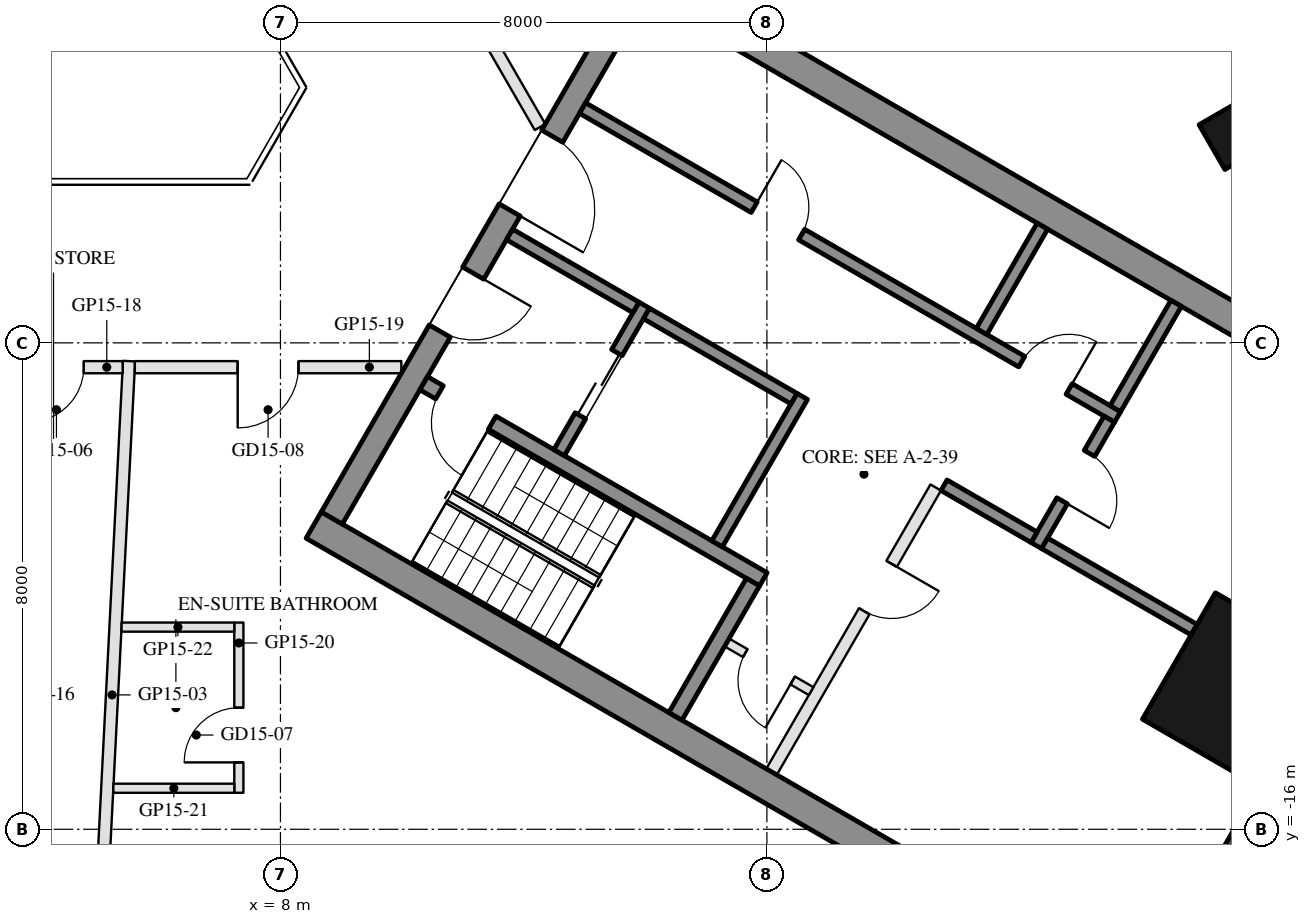
"""IFC4 building model, lengths in metres.
Left out: names, types, materials, properties, quantities, classifications, styles, units other than length and angle.
Written with IfcOpenShell. Run it as: python <this file> out.ifc"""

import sys

from ifc_helpers import new_model, si_unit, direction, frame, frame_2d, origin, origin_2d, place, context, subcontext, project, spatial, rectangle, hollow_rectangle, extrude, element, fill, save


model = new_model("IFC4")
c1 = context("Model", 3, precision=1e-05, world=origin(), true_north=direction((0.0, 1.0)))
c2 = subcontext(c1, "Body", "Model", "MODEL_VIEW")
j1 = project(units=[si_unit("LENGTHUNIT", "METRE"), si_unit("PLANEANGLEUNIT", "RADIAN")], contexts=[c1])
p1 = place(None, origin())
s1 = spatial("IfcSite", under=j1, at=p1, CompositionType="ELEMENT")
p2 = place(p1, origin())
s2 = spatial("IfcBuilding", under=s1, at=p2, CompositionType="ELEMENT")
p3 = place(p2, frame((0.0, 0.0, 168.8)))
s3 = spatial("IfcBuildingStorey", under=s2, at=p3, CompositionType="ELEMENT", Elevation=168.8)
p4 = place(p3, frame((23.688, -4.568, 0.0), z_axis=(0.0, 0.0, 1.0), x_axis=(-0.5, 0.866025403784, 0.0)))
e1 = element("IfcColumn", 1, at=p4, inside=s3, PredefinedType="COLUMN", context=c2, shape_type="SweptSolid", body=[
    extrude(hollow_rectangle(XDim=0.85, YDim=0.85, WallThickness=0.04, at=origin_2d()), origin(), (0.0, 0.0, 1.0), 3.7),
])
p5 = place(p3, frame((23.729, -13.7, 0.0), z_axis=(0.0, 0.0, 1.0), x_axis=(0.5, 0.866025403784, 0.0)))
e2 = element("IfcColumn", 2, at=p5, inside=s3, PredefinedType="COLUMN", context=c2, shape_type="SweptSolid", body=[
    extrude(hollow_rectangle(XDim=2.4, YDim=2.2, WallThickness=0.06, at=origin_2d()), origin(), (0.0, 0.0, 1.0), 3.7),
])
p6 = place(p3, frame((23.427, -16.792, 0.0), z_axis=(0.0, 0.0, 1.0), x_axis=(0.500018773155, 0.866014564827, 0.0)))
e3 = element("IfcWall", 3, at=p6, inside=s3, PredefinedType="SOLIDWALL", context=c2, shape_type="SweptSolid", body=[
    extrude(rectangle(XDim=5.658, YDim=0.35, at=frame_2d((2.829, 0.0))), origin(), (0.0, 0.0, 1.0), 3.55),
])
p7 = place(p3, frame((26.257, -6.567, 0.0), z_axis=(0.0, 0.0, 1.0), x_axis=(-0.500023526245, 0.866011820475, 0.0)))
e4 = element("IfcWall", 4, at=p7, inside=s3, PredefinedType="SOLIDWALL", context=c2, shape_type="SweptSolid", body=[
    extrude(rectangle(XDim=11.816, YDim=0.35, at=frame_2d((5.908, 0.0))), origin(), (0.0, 0.0, 1.0), 3.55),
])
p8 = place(p7, frame((0.38, 0.0, 0.3)))
e5 = element("IfcOpeningElement", 5, at=p8, cuts=e4, PredefinedType="OPENING", context=c2, shape_type="SweptSolid", body=[
    extrude(rectangle(XDim=1.8, YDim=2.65, at=frame_2d((0.9, 1.325))), frame((0.0, 0.185, 0.0), z_axis=(0.0, -1.0, 0.0), x_axis=(1.0, 0.0, 0.0)), (0.0, 0.0, 1.0), 0.37),
])
p9 = place(p7, frame((7.741, 0.0, 0.0)))
e6 = element("IfcOpeningElement", 6, at=p9, cuts=e4, PredefinedType="OPENING", context=c2, shape_type="SweptSolid", body=[
    extrude(rectangle(XDim=2.4, YDim=2.4, at=frame_2d((1.2, 1.2))), frame((0.0, 0.185, 0.0), z_axis=(0.0, -1.0, 0.0), x_axis=(1.0, 0.0, 0.0)), (0.0, 0.0, 1.0), 0.37),
])
p10 = place(p7, frame((3.791, 0.0, 0.3)))
e7 = element("IfcOpeningElement", 7, at=p10, cuts=e4, PredefinedType="OPENING", context=c2, shape_type="SweptSolid", body=[
    extrude(rectangle(XDim=1.6, YDim=2.65, at=frame_2d((0.8, 1.325))), frame((0.0, 0.185, 0.0), z_axis=(0.0, -1.0, 0.0), x_axis=(1.0, 0.0, 0.0)), (0.0, 0.0, 1.0), 0.37),
])
p11 = place(p7, frame((5.691, 0.0, 0.3)))
e8 = element("IfcOpeningElement", 8, at=p11, cuts=e4, PredefinedType="OPENING", context=c2, shape_type="SweptSolid", body=[
    extrude(rectangle(XDim=1.6, YDim=2.65, at=frame_2d((0.8, 1.325))), frame((0.0, 0.185, 0.0), z_axis=(0.0, -1.0, 0.0), x_axis=(1.0, 0.0, 0.0)), (0.0, 0.0, 1.0), 0.37),
])
for number, where, z_axis, x_axis in (
    (9, (8.547, -10.997, 0.0), (0.0, 0.0, 1.0), (0.866, -0.5, 0.0)),
    (10, (13.797, -1.903, 0.0), (0.0, 0.0, 1.0), (0.866, -0.5, 0.0)),
):
    element("IfcWall", number, at=place(p3, frame(where, z_axis=z_axis, x_axis=x_axis)), inside=s3, PredefinedType="SHEAR", context=c2, shape_type="SweptSolid", body=[
        extrude(rectangle(XDim=14.837, YDim=0.5, at=frame_2d((7.418, 0.0))), origin(), (0.0, 0.0, 1.0), 3.5),
    ])
p12 = place(p3, frame((8.845, -10.88, 0.0), z_axis=(0.0, 0.0, 1.0), x_axis=(0.500004234368, 0.866022959057, 0.0)))
e11 = element("IfcWall", 11, at=p12, inside=s3, PredefinedType="SHEAR", context=c2, shape_type="SweptSolid", body=[
    extrude(rectangle(XDim=10.0, YDim=0.4, at=frame_2d((5.0, 0.0))), origin(), (0.0, 0.0, 1.0), 3.5),
])
p13 = place(p12, frame((3.55, 0.0, 0.0)))
e12 = element("IfcOpeningElement", 12, at=p13, cuts=e11, PredefinedType="OPENING", context=c2, shape_type="SweptSolid", body=[
    extrude(rectangle(XDim=1.1, YDim=2.1, at=frame_2d((0.55, 1.05))), frame((0.0, 0.21, 0.0), z_axis=(0.0, -1.0, 0.0), x_axis=(1.0, 0.0, 0.0)), (0.0, 0.0, 1.0), 0.42),
])
p14 = place(p12, frame((5.85, 0.0, 0.0)))
e13 = element("IfcOpeningElement", 13, at=p14, cuts=e11, PredefinedType="OPENING", context=c2, shape_type="SweptSolid", body=[
    extrude(rectangle(XDim=1.4, YDim=2.1, at=frame_2d((0.7, 1.05))), frame((0.0, 0.21, 0.0), z_axis=(0.0, -1.0, 0.0), x_axis=(1.0, 0.0, 0.0)), (0.0, 0.0, 1.0), 0.42),
])
p15 = place(p3, frame((10.356, -8.664, 0.0), z_axis=(0.0, 0.0, 1.0), x_axis=(0.866028629588, -0.499994412703, 0.0)))
e14 = element("IfcWall", 14, at=p15, inside=s3, PredefinedType="SHEAR", context=c2, shape_type="SweptSolid", body=[
    extrude(rectangle(XDim=6.45, YDim=0.25, at=frame_2d((3.225, 0.0))), origin(), (0.0, 0.0, 1.0), 3.5),
])
p16 = place(p15, frame((0.3, 0.0, 0.0)))
e15 = element("IfcOpeningElement", 15, at=p16, cuts=e14, PredefinedType="OPENING", context=c2, shape_type="SweptSolid", body=[
    extrude(rectangle(XDim=1.0, YDim=2.1, at=frame_2d((0.5, 1.05))), frame((0.0, 0.135, 0.0), z_axis=(0.0, -1.0, 0.0), x_axis=(1.0, 0.0, 0.0)), (0.0, 0.0, 1.0), 0.27),
])
p17 = place(p3, frame((14.496, -14.143, 0.0), z_axis=(0.0, 0.0, 1.0), x_axis=(0.500062241894, 0.865989465428, 0.0)))
e16 = element("IfcWall", 16, at=p17, inside=s3, PredefinedType="SHEAR", context=c2, shape_type="SweptSolid", body=[
    extrude(rectangle(XDim=2.55, YDim=0.25, at=frame_2d((1.275, 0.0))), origin(), (0.0, 0.0, 1.0), 3.5),
])
p18 = place(p3, frame((15.181, -11.305, 0.0), z_axis=(0.0, 0.0, 1.0), x_axis=(0.49994636267, 0.866056369097, 0.0)))
e17 = element("IfcWall", 17, at=p18, inside=s3, PredefinedType="SHEAR", context=c2, shape_type="SweptSolid", body=[
    extrude(rectangle(XDim=2.8, YDim=0.2, at=frame_2d((1.4, 0.0))), origin(), (0.0, 0.0, 1.0), 3.5),
])
p19 = place(p3, frame((12.583, -9.805, 0.0), z_axis=(0.0, 0.0, 1.0), x_axis=(0.49994636267, 0.866056369097, 0.0)))
e18 = element("IfcWall", 18, at=p19, inside=s3, PredefinedType="SHEAR", context=c2, shape_type="SweptSolid", body=[
    extrude(rectangle(XDim=2.8, YDim=0.2, at=frame_2d((1.4, 0.0))), origin(), (0.0, 0.0, 1.0), 3.5),
])
p20 = place(p19, frame((0.7, 0.0, 0.0)))
e19 = element("IfcOpeningElement", 19, at=p20, cuts=e18, PredefinedType="OPENING", context=c2, shape_type="SweptSolid", body=[
    extrude(rectangle(XDim=1.2, YDim=2.1, at=frame_2d((0.6, 1.05))), frame((0.0, 0.11, 0.0), z_axis=(0.0, -1.0, 0.0), x_axis=(1.0, 0.0, 0.0)), (0.0, 0.0, 1.0), 0.22),
])
p21 = place(p3, frame((11.768, -6.217, 0.0), z_axis=(0.0, 0.0, 1.0), x_axis=(0.866050077142, -0.499957262057, 0.0)))
e20 = element("IfcWall", 20, at=p21, inside=s3, PredefinedType="SHEAR", context=c2, shape_type="SweptSolid", body=[
    extrude(rectangle(XDim=2.4, YDim=0.2, at=frame_2d((1.2, 0.0))), origin(), (0.0, 0.0, 1.0), 3.5),
])
p22 = place(p3, frame((14.02, -7.517, 0.0), z_axis=(0.0, 0.0, 1.0), x_axis=(0.866034573852, -0.49998411664, 0.0)))
e21 = element("IfcWall", 21, at=p22, inside=s3, PredefinedType="SHEAR", context=c2, shape_type="SweptSolid", body=[
    extrude(rectangle(XDim=2.8, YDim=0.2, at=frame_2d((1.4, 0.0))), origin(), (0.0, 0.0, 1.0), 3.5),
])
p23 = place(p3, frame((12.968, -4.138, 0.0), z_axis=(0.0, 0.0, 1.0), x_axis=(0.866028328073, -0.49999493495, 0.0)))
e22 = element("IfcWall", 22, at=p23, inside=s3, PredefinedType="SHEAR", context=c2, shape_type="SweptSolid", body=[
    extrude(rectangle(XDim=10.16, YDim=0.2, at=frame_2d((5.08, 0.0))), origin(), (0.0, 0.0, 1.0), 3.5),
])
p24 = place(p23, frame((3.26, 0.0, 0.0)))
e23 = element("IfcOpeningElement", 23, at=p24, cuts=e22, PredefinedType="OPENING", context=c2, shape_type="SweptSolid", body=[
    extrude(rectangle(XDim=0.9, YDim=2.1, at=frame_2d((0.45, 1.05))), frame((0.0, 0.11, 0.0), z_axis=(0.0, -1.0, 0.0), x_axis=(1.0, 0.0, 0.0)), (0.0, 0.0, 1.0), 0.22),
])
p25 = place(p23, frame((8.34, 0.0, 0.0)))
e24 = element("IfcOpeningElement", 24, at=p25, cuts=e22, PredefinedType="OPENING", context=c2, shape_type="SweptSolid", body=[
    extrude(rectangle(XDim=0.9, YDim=2.1, at=frame_2d((0.45, 1.05))), frame((0.0, 0.11, 0.0), z_axis=(0.0, -1.0, 0.0), x_axis=(1.0, 0.0, 0.0)), (0.0, 0.0, 1.0), 0.22),
])
p26 = place(p3, frame((20.43, -11.333, 0.0), z_axis=(0.0, 0.0, 1.0), x_axis=(0.500001309137, 0.866024647952, 0.0)))
e25 = element("IfcWall", 25, at=p26, inside=s3, PredefinedType="SHEAR", context=c2, shape_type="SweptSolid", body=[
    extrude(rectangle(XDim=2.4, YDim=0.2, at=frame_2d((1.2, 0.0))), origin(), (0.0, 0.0, 1.0), 3.5),
])
p27 = place(p26, frame((0.85, 0.0, 0.0)))
e26 = element("IfcOpeningElement", 26, at=p27, cuts=e25, PredefinedType="OPENING", context=c2, shape_type="SweptSolid", body=[
    extrude(rectangle(XDim=0.9, YDim=2.1, at=frame_2d((0.45, 1.05))), frame((0.0, 0.11, 0.0), z_axis=(0.0, -1.0, 0.0), x_axis=(1.0, 0.0, 0.0)), (0.0, 0.0, 1.0), 0.22),
])
p28 = place(p3, frame((18.913, -10.342, 0.0), z_axis=(0.0, 0.0, 1.0), x_axis=(0.866038183914, -0.499977863513, 0.0)))
e27 = element("IfcWall", 27, at=p28, inside=s3, PredefinedType="SHEAR", context=c2, shape_type="SweptSolid", body=[
    extrude(rectangle(XDim=1.71, YDim=0.2, at=frame_2d((0.855, 0.0))), origin(), (0.0, 0.0, 1.0), 3.5),
])
for number, where, z_axis, x_axis in (
    (28, (19.531, -7.812, 0.0), (0.0, 0.0, 1.0), (0.5, 0.866, 0.0)),
    (29, (21.73, -9.082, 0.0), (0.0, 0.0, 1.0), (0.5, 0.866, 0.0)),
):
    element("IfcWall", number, at=place(p3, frame(where, z_axis=z_axis, x_axis=x_axis)), inside=s3, PredefinedType="SHEAR", context=c2, shape_type="SweptSolid", body=[
        extrude(rectangle(XDim=2.0, YDim=0.2, at=frame_2d((1.0, 0.0))), origin(), (0.0, 0.0, 1.0), 3.5),
    ])
p29 = place(p3, frame((20.567, -11.297, 0.0), z_axis=(0.0, 0.0, 1.0), x_axis=(0.866055327414, -0.49994816717, 0.0)))
e30 = element("IfcWall", 30, at=p29, inside=s3, PredefinedType="SHEAR", context=c2, shape_type="SweptSolid", body=[
    extrude(rectangle(XDim=2.84, YDim=0.2, at=frame_2d((1.42, 0.0))), origin(), (0.0, 0.0, 1.0), 3.5),
])
p30 = place(p3, frame((16.076, -15.055, 0.0), z_axis=(0.0, 0.0, 1.0), x_axis=(0.499995103361, 0.866028230842, 0.0)))
e31 = element("IfcWall", 31, at=p30, inside=s3, PredefinedType="PARTITIONING", context=c2, shape_type="SweptSolid", body=[
    extrude(rectangle(XDim=5.4, YDim=0.2, at=frame_2d((2.7, 0.0))), origin(), (0.0, 0.0, 1.0), 3.5),
])
p31 = place(p30, frame((3.05, 0.0, 0.0)))
e32 = element("IfcOpeningElement", 32, at=p31, cuts=e31, PredefinedType="OPENING", context=c2, shape_type="SweptSolid", body=[
    extrude(rectangle(XDim=0.9, YDim=2.1, at=frame_2d((0.45, 1.05))), frame((0.0, 0.11, 0.0), z_axis=(0.0, -1.0, 0.0), x_axis=(1.0, 0.0, 0.0)), (0.0, 0.0, 1.0), 0.22),
])
p32 = place(p3, frame((15.342, -12.928, 0.0), z_axis=(0.0, 0.0, 1.0), x_axis=(0.865989903783, -0.500061482766, 0.0)))
e33 = element("IfcWall", 33, at=p32, inside=s3, PredefinedType="PARTITIONING", context=c2, shape_type="SweptSolid", body=[
    extrude(rectangle(XDim=1.6, YDim=0.15, at=frame_2d((0.8, 0.0))), origin(), (0.0, 0.0, 1.0), 3.5),
])
p33 = place(p32, frame((0.35, 0.0, 0.0)))
e34 = element("IfcOpeningElement", 34, at=p33, cuts=e33, PredefinedType="OPENING", context=c2, shape_type="SweptSolid", body=[
    extrude(rectangle(XDim=0.9, YDim=2.1, at=frame_2d((0.45, 1.05))), frame((0.0, 0.085, 0.0), z_axis=(0.0, -1.0, 0.0), x_axis=(1.0, 0.0, 0.0)), (0.0, 0.0, 1.0), 0.17),
])
p34 = place(p3, frame((4.95, -19.28, 0.0), z_axis=(0.0, 0.0, 1.0), x_axis=(0.050963172582, 0.998700533213, 0.0)))
e35 = element("IfcWall", 35, at=p34, inside=s3, PredefinedType="PARTITIONING", context=c2, shape_type="SweptSolid", body=[
    extrude(rectangle(XDim=10.994, YDim=0.2, at=frame_2d((5.497, 0.0))), origin(), (0.0, 0.0, 1.0), 3.06),
])
p35 = place(p3, frame((5.405, -8.4, 0.0), z_axis=(0.0, 0.0, 1.0), x_axis=(-1.0, 0.0, 0.0)))
e36 = element("IfcWall", 36, at=p35, inside=s3, PredefinedType="PARTITIONING", context=c2, shape_type="SweptSolid", body=[
    extrude(rectangle(XDim=2.178, YDim=0.2, at=frame_2d((1.089, 0.0))), origin(), (0.0, 0.0, 1.0), 2.95),
])
p36 = place(p35, frame((0.639, 0.0, 0.0)))
e37 = element("IfcOpeningElement", 37, at=p36, cuts=e36, PredefinedType="OPENING", context=c2, shape_type="SweptSolid", body=[
    extrude(rectangle(XDim=0.9, YDim=2.1, at=frame_2d((0.45, 1.05))), frame((0.0, 0.11, 0.0), z_axis=(0.0, -1.0, 0.0), x_axis=(1.0, 0.0, 0.0)), (0.0, 0.0, 1.0), 0.22),
])
p37 = place(p3, frame((9.988, -8.4, 0.0), z_axis=(0.0, 0.0, 1.0), x_axis=(-1.0, 0.0, 0.0)))
e38 = element("IfcWall", 38, at=p37, inside=s3, PredefinedType="PARTITIONING", context=c2, shape_type="SweptSolid", body=[
    extrude(rectangle(XDim=4.383, YDim=0.2, at=frame_2d((2.191, 0.0))), origin(), (0.0, 0.0, 1.0), 2.95),
])
p38 = place(p37, frame((1.691, 0.0, 0.0)))
e39 = element("IfcOpeningElement", 39, at=p38, cuts=e38, PredefinedType="OPENING", context=c2, shape_type="SweptSolid", body=[
    extrude(rectangle(XDim=1.0, YDim=2.1, at=frame_2d((0.5, 1.05))), frame((0.0, 0.11, 0.0), z_axis=(0.0, -1.0, 0.0), x_axis=(1.0, 0.0, 0.0)), (0.0, 0.0, 1.0), 0.22),
])
p39 = place(p3, frame((7.316, -15.4, 0.0), z_axis=(0.0, 0.0, 1.0), x_axis=(0.0, 1.0, 0.0)))
e40 = element("IfcWall", 40, at=p39, inside=s3, PredefinedType="PARTITIONING", context=c2, shape_type="SweptSolid", body=[
    extrude(rectangle(XDim=2.8, YDim=0.15, at=frame_2d((1.4, 0.0))), origin(), (0.0, 0.0, 1.0), 3.55),
])
p40 = place(p39, frame((0.5, 0.0, 0.0)))
e41 = element("IfcOpeningElement", 41, at=p40, cuts=e40, PredefinedType="OPENING", context=c2, shape_type="SweptSolid", body=[
    extrude(rectangle(XDim=0.9, YDim=2.1, at=frame_2d((0.45, 1.05))), frame((0.0, 0.085, 0.0), z_axis=(0.0, -1.0, 0.0), x_axis=(1.0, 0.0, 0.0)), (0.0, 0.0, 1.0), 0.17),
])
p41 = place(p3, frame((5.252, -15.325, 0.0), z_axis=(0.0, 0.0, 1.0), x_axis=(1.0, 0.0, 0.0)))
e42 = element("IfcWall", 42, at=p41, inside=s3, PredefinedType="PARTITIONING", context=c2, shape_type="SweptSolid", body=[
    extrude(rectangle(XDim=1.989, YDim=0.15, at=frame_2d((0.995, 0.0))), origin(), (0.0, 0.0, 1.0), 3.55),
])
p42 = place(p3, frame((5.387, -12.675, 0.0), z_axis=(0.0, 0.0, 1.0), x_axis=(1.0, 0.0, 0.0)))
e43 = element("IfcWall", 43, at=p42, inside=s3, PredefinedType="PARTITIONING", context=c2, shape_type="SweptSolid", body=[
    extrude(rectangle(XDim=1.854, YDim=0.15, at=frame_2d((0.927, 0.0))), origin(), (0.0, 0.0, 1.0), 3.55),
])
p43 = place(p3, frame((9.931, -0.401, 0.0), z_axis=(0.0, 0.0, 1.0), x_axis=(0.5000418389, -0.866001246737, 0.0)))
e44 = element("IfcWall", 44, at=p43, inside=s3, PredefinedType="PARTITIONING", context=c2, shape_type="SweptSolid", body=[
    extrude(rectangle(XDim=4.676, YDim=0.2, at=frame_2d((2.338, 0.0))), origin(), (0.0, 0.0, 1.0), 2.95),
])
p44 = place(p43, frame((1.838, 0.0, 0.0)))
e45 = element("IfcOpeningElement", 45, at=p44, cuts=e44, PredefinedType="OPENING", context=c2, shape_type="SweptSolid", body=[
    extrude(rectangle(XDim=1.0, YDim=2.1, at=frame_2d((0.5, 1.05))), frame((0.0, 0.11, 0.0), z_axis=(0.0, -1.0, 0.0), x_axis=(1.0, 0.0, 0.0)), (0.0, 0.0, 1.0), 0.22),
])
p45 = place(p10, origin())
e46 = element("IfcWindow", 46, at=p45, inside=s3, PartitioningType="SINGLE_PANEL", PredefinedType="WINDOW", context=c2, shape_type="SweptSolid", body=[
    extrude(rectangle(XDim=1.6, YDim=2.65, at=frame_2d((0.8, 1.325))), frame((0.0, 0.03, 0.0), z_axis=(0.0, -1.0, 0.0), x_axis=(1.0, 0.0, 0.0)), (0.0, 0.0, 1.0), 0.06),
])
fill(e7, e46)
p46 = place(p20, origin())
e47 = element("IfcDoor", 47, at=p46, inside=s3, OperationType="DOUBLE_DOOR_SLIDING", PredefinedType="DOOR", context=c2, shape_type="SweptSolid", body=[
    extrude(rectangle(XDim=1.2, YDim=2.1, at=frame_2d((0.6, 1.05))), frame((0.0, 0.025, 0.0), z_axis=(0.0, -1.0, 0.0), x_axis=(1.0, 0.0, 0.0)), (0.0, 0.0, 1.0), 0.05),
])
fill(e19, e47)
p47 = place(p33, frame((0.9, 0.0, 0.0), z_axis=(0.0, 0.0, 1.0), x_axis=(-1.0, 0.0, 0.0)))
e48 = element("IfcDoor", 48, at=p47, inside=s3, OperationType="SINGLE_SWING_LEFT", PredefinedType="DOOR", context=c2, shape_type="SweptSolid", body=[
    extrude(rectangle(XDim=0.9, YDim=2.1, at=frame_2d((0.45, 1.05))), frame((0.0, 0.025, 0.0), z_axis=(0.0, -1.0, 0.0), x_axis=(1.0, 0.0, 0.0)), (0.0, 0.0, 1.0), 0.05),
])
fill(e34, e48)
p48 = place(p24, origin())
e49 = element("IfcDoor", 49, at=p48, inside=s3, OperationType="SINGLE_SWING_LEFT", PredefinedType="DOOR", context=c2, shape_type="SweptSolid", body=[
    extrude(rectangle(XDim=0.9, YDim=2.1, at=frame_2d((0.45, 1.05))), frame((0.0, 0.025, 0.0), z_axis=(0.0, -1.0, 0.0), x_axis=(1.0, 0.0, 0.0)), (0.0, 0.0, 1.0), 0.05),
])
fill(e23, e49)
p49 = place(p25, origin())
e50 = element("IfcDoor", 50, at=p49, inside=s3, OperationType="SINGLE_SWING_RIGHT", PredefinedType="DOOR", context=c2, shape_type="SweptSolid", body=[
    extrude(rectangle(XDim=0.9, YDim=2.1, at=frame_2d((0.45, 1.05))), frame((0.0, 0.025, 0.0), z_axis=(0.0, -1.0, 0.0), x_axis=(1.0, 0.0, 0.0)), (0.0, 0.0, 1.0), 0.05),
])
fill(e24, e50)
p50 = place(p27, frame((0.9, 0.0, 0.0), z_axis=(0.0, 0.0, 1.0), x_axis=(-1.0, 0.0, 0.0)))
e51 = element("IfcDoor", 51, at=p50, inside=s3, OperationType="SINGLE_SWING_RIGHT", PredefinedType="DOOR", context=c2, shape_type="SweptSolid", body=[
    extrude(rectangle(XDim=0.9, YDim=2.1, at=frame_2d((0.45, 1.05))), frame((0.0, 0.025, 0.0), z_axis=(0.0, -1.0, 0.0), x_axis=(1.0, 0.0, 0.0)), (0.0, 0.0, 1.0), 0.05),
])
fill(e26, e51)
p51 = place(p31, frame((0.9, 0.0, 0.0), z_axis=(0.0, 0.0, 1.0), x_axis=(-1.0, 0.0, 0.0)))
e52 = element("IfcDoor", 52, at=p51, inside=s3, OperationType="SINGLE_SWING_LEFT", PredefinedType="DOOR", context=c2, shape_type="SweptSolid", body=[
    extrude(rectangle(XDim=0.9, YDim=2.1, at=frame_2d((0.45, 1.05))), frame((0.0, 0.025, 0.0), z_axis=(0.0, -1.0, 0.0), x_axis=(1.0, 0.0, 0.0)), (0.0, 0.0, 1.0), 0.05),
])
fill(e32, e52)
p52 = place(p13, frame((1.1, 0.0, 0.0), z_axis=(0.0, 0.0, 1.0), x_axis=(-1.0, 0.0, 0.0)))
e53 = element("IfcDoor", 53, at=p52, inside=s3, OperationType="SINGLE_SWING_LEFT", PredefinedType="DOOR", context=c2, shape_type="SweptSolid", body=[
    extrude(rectangle(XDim=1.1, YDim=2.1, at=frame_2d((0.55, 1.05))), frame((0.0, 0.025, 0.0), z_axis=(0.0, -1.0, 0.0), x_axis=(1.0, 0.0, 0.0)), (0.0, 0.0, 1.0), 0.05),
])
fill(e12, e53)
p53 = place(p14, frame((1.4, 0.0, 0.0), z_axis=(0.0, 0.0, 1.0), x_axis=(-1.0, 0.0, 0.0)))
e54 = element("IfcDoor", 54, at=p53, inside=s3, OperationType="DOUBLE_DOOR_SINGLE_SWING", PredefinedType="DOOR", context=c2, shape_type="SweptSolid", body=[
    extrude(rectangle(XDim=1.4, YDim=2.1, at=frame_2d((0.7, 1.05))), frame((0.0, 0.025, 0.0), z_axis=(0.0, -1.0, 0.0), x_axis=(1.0, 0.0, 0.0)), (0.0, 0.0, 1.0), 0.05),
])
fill(e13, e54)
p54 = place(p16, frame((1.0, 0.0, 0.0), z_axis=(0.0, 0.0, 1.0), x_axis=(-1.0, 0.0, 0.0)))
e55 = element("IfcDoor", 55, at=p54, inside=s3, OperationType="SINGLE_SWING_LEFT", PredefinedType="DOOR", context=c2, shape_type="SweptSolid", body=[
    extrude(rectangle(XDim=1.0, YDim=2.1, at=frame_2d((0.5, 1.05))), frame((0.0, 0.025, 0.0), z_axis=(0.0, -1.0, 0.0), x_axis=(1.0, 0.0, 0.0)), (0.0, 0.0, 1.0), 0.05),
])
fill(e15, e55)
p55 = place(p36, origin())
e56 = element("IfcDoor", 56, at=p55, inside=s3, OperationType="SINGLE_SWING_RIGHT", PredefinedType="DOOR", context=c2, shape_type="SweptSolid", body=[
    extrude(rectangle(XDim=0.9, YDim=2.1, at=frame_2d((0.45, 1.05))), frame((0.0, 0.025, 0.0), z_axis=(0.0, -1.0, 0.0), x_axis=(1.0, 0.0, 0.0)), (0.0, 0.0, 1.0), 0.05),
])
fill(e37, e56)
p56 = place(p40, origin())
e57 = element("IfcDoor", 57, at=p56, inside=s3, OperationType="SINGLE_SWING_LEFT", PredefinedType="DOOR", context=c2, shape_type="SweptSolid", body=[
    extrude(rectangle(XDim=0.9, YDim=2.1, at=frame_2d((0.45, 1.05))), frame((0.0, 0.025, 0.0), z_axis=(0.0, -1.0, 0.0), x_axis=(1.0, 0.0, 0.0)), (0.0, 0.0, 1.0), 0.05),
])
fill(e41, e57)
p57 = place(p38, origin())
e58 = element("IfcDoor", 58, at=p57, inside=s3, OperationType="SINGLE_SWING_RIGHT", PredefinedType="DOOR", context=c2, shape_type="SweptSolid", body=[
    extrude(rectangle(XDim=1.0, YDim=2.1, at=frame_2d((0.5, 1.05))), frame((0.0, 0.025, 0.0), z_axis=(0.0, -1.0, 0.0), x_axis=(1.0, 0.0, 0.0)), (0.0, 0.0, 1.0), 0.05),
])
fill(e39, e58)
save(model, sys.argv[1])
